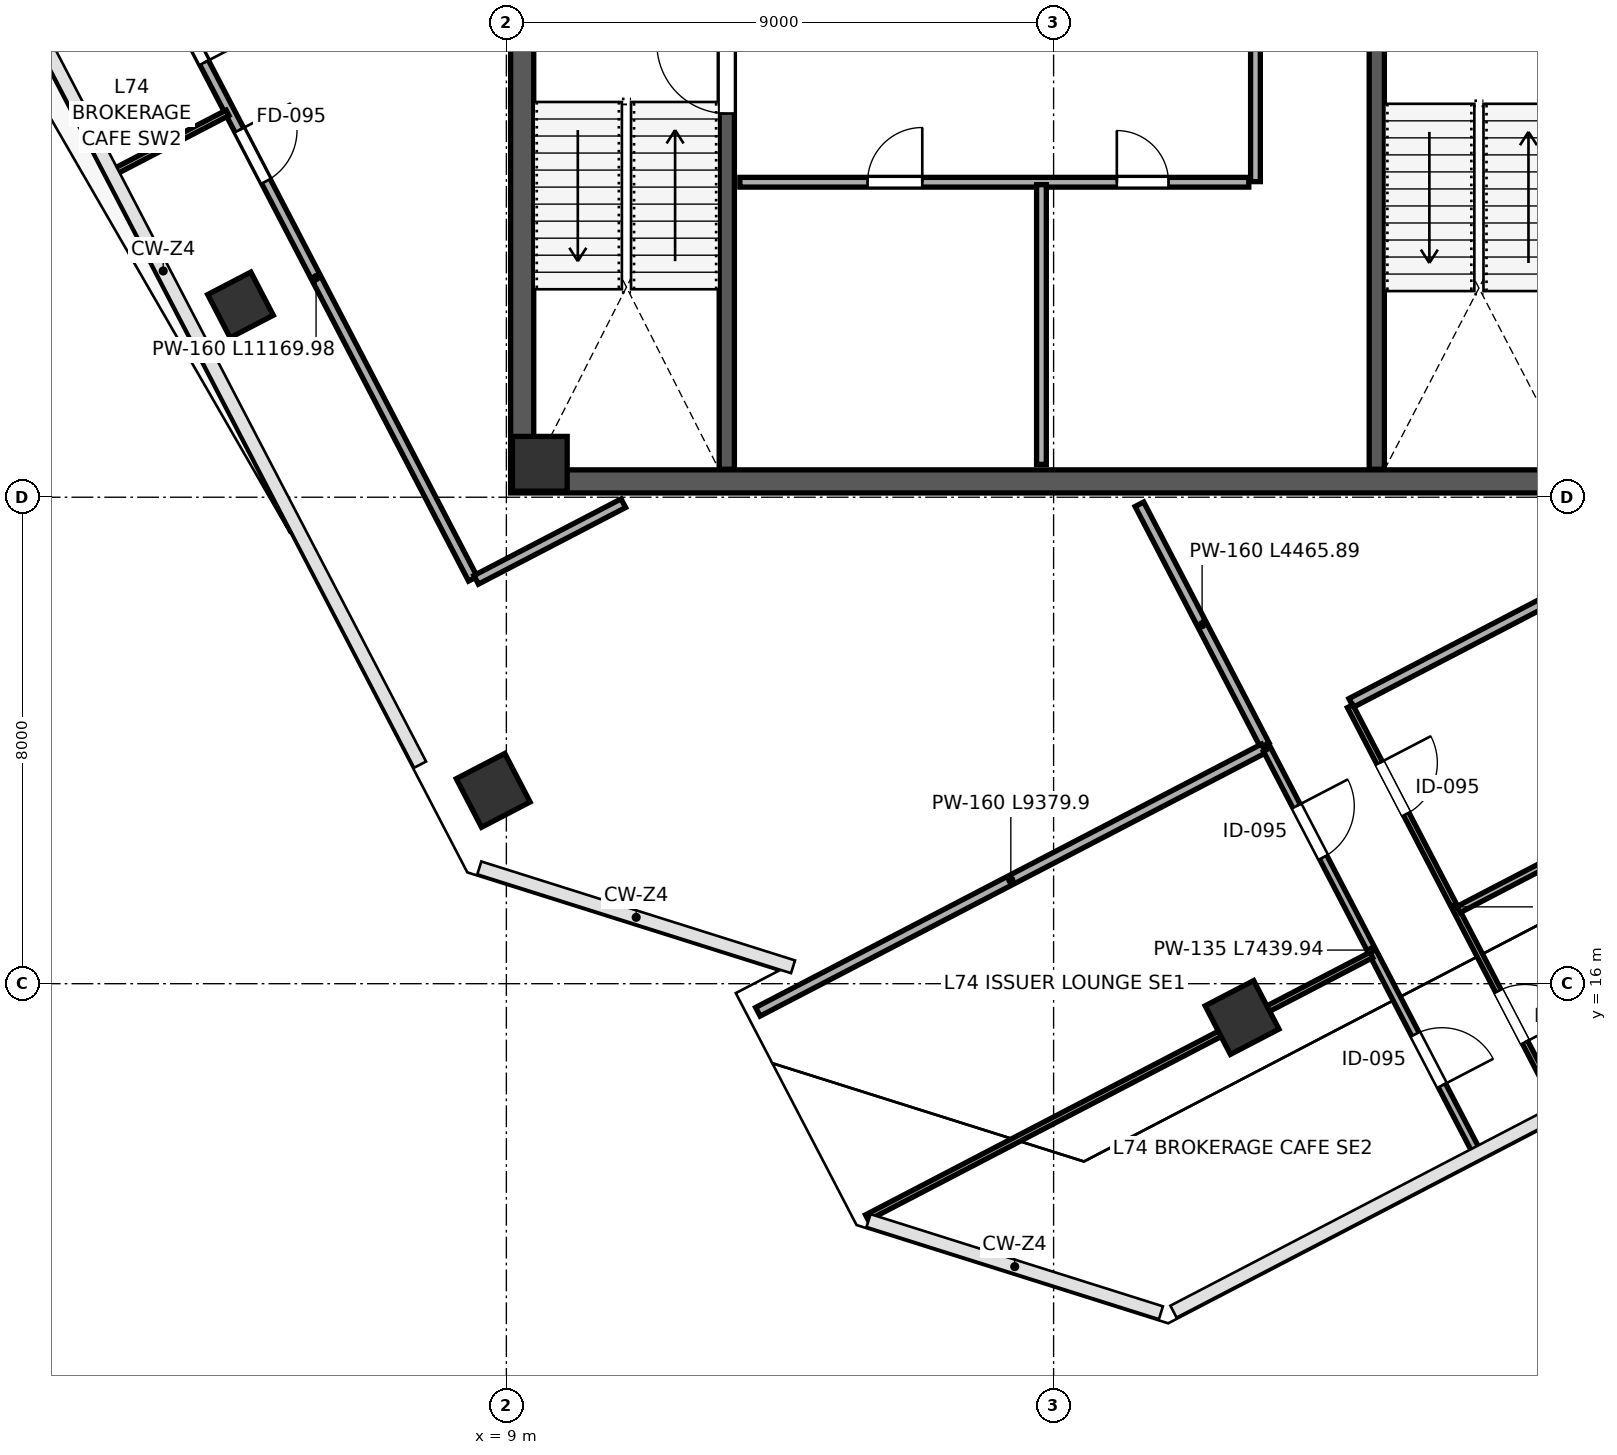
"""IFC4 building model, lengths in metres.
Left out: names, types, materials, properties, quantities, classifications, styles, units other than length and angle.
Written with IfcOpenShell. Run it as: python <this file> out.ifc"""

import sys

from ifc_helpers import new_model, si_unit, direction, frame, frame_2d, origin, origin_2d, place, context, subcontext, project, spatial, rectangle, extrude, source, transform, mapped, element, fill, save


model = new_model("IFC4")
c1 = context("Model", 3, precision=1e-05, world=origin(), true_north=direction((0.0, 1.0)))
c2 = subcontext(c1, "Body", "Model", "MODEL_VIEW")
j1 = project(units=[si_unit("LENGTHUNIT", "METRE"), si_unit("PLANEANGLEUNIT", "RADIAN")], contexts=[c1])
p1 = place(None, origin())
s1 = spatial("IfcSite", under=j1, at=p1, CompositionType="ELEMENT")
p2 = place(p1, origin())
s2 = spatial("IfcBuilding", under=s1, at=p2, CompositionType="ELEMENT")
p3 = place(p2, frame((0.0, 0.0, 328.2)))
s3 = spatial("IfcBuildingStorey", under=s2, at=p3, CompositionType="ELEMENT", Elevation=328.2)
m1 = source(origin(), c2, "Body", "SweptSolid", [
    extrude(rectangle(XDim=0.9, YDim=0.9, at=origin_2d()), origin(), (0.0, 0.0, 1.0), 4.198),
])
p4 = place(p3, frame((9.55, 24.55, 0.001), z_axis=(0.0, 0.0, 1.0), x_axis=(1.0, 0.0, 0.0)))
e1 = element("IfcColumn", 1, at=p4, inside=s3, PredefinedType="COLUMN", context=c2, shape_type="MappedRepresentation", body=[
    mapped(m1, transform((0.0, 0.0, 0.0), scale=1.0)),
])
m2 = source(origin(), c2, "Body", "SweptSolid", [
    extrude(rectangle(XDim=0.8, YDim=0.8, at=origin_2d()), origin(), (0.0, 0.0, 1.0), 4.198),
])
p5 = place(p3, frame((4.627, 27.163, 0.001), z_axis=(0.0, 0.0, 1.0), x_axis=(-0.461748613235, 0.887010833178, 0.0)))
e2 = element("IfcColumn", 2, at=p5, inside=s3, PredefinedType="COLUMN", context=c2, shape_type="MappedRepresentation", body=[
    mapped(m2, transform((0.0, 0.0, 0.0), scale=1.0)),
])
m3 = source(origin(), c2, "Body", "SweptSolid", [
    extrude(rectangle(XDim=0.9, YDim=0.9, at=origin_2d()), origin(), (0.0, 0.0, 1.0), 4.198),
])
for number, where, z_axis, x_axis in (
    (3, (8.783, 19.179, 0.001), (0.0, 0.0, 1.0), (-0.462, 0.887, 0.0)),
    (4, (21.099, 15.444, 0.001), (0.0, 0.0, 1.0), (-0.462, 0.887, 0.0)),
):
    element("IfcColumn", number, at=place(p3, frame(where, z_axis=z_axis, x_axis=x_axis)), inside=s3, PredefinedType="COLUMN", context=c2, shape_type="MappedRepresentation", body=[
        mapped(m3, transform((0.0, 0.0, 0.0), scale=1.0)),
    ])
p6 = place(p3, frame((9.26, 24.45, 0.0), z_axis=(0.0, 0.0, 1.0), x_axis=(0.0, 1.0, 0.0)))
e5 = element("IfcWall", 5, at=p6, inside=s3, PredefinedType="SHEAR", context=c2, shape_type="SweptSolid", body=[
    extrude(rectangle(XDim=15.1, YDim=0.38, at=frame_2d((7.55, 0.0))), origin(), (0.0, 0.0, 1.0), 3.96),
])
p7 = place(p6, frame((8.7, 0.0, 0.0)))
e6 = element("IfcOpeningElement", 6, at=p7, cuts=e5, PredefinedType="OPENING", context=c2, shape_type="SweptSolid", body=[
    extrude(rectangle(XDim=1.15, YDim=2.2, at=frame_2d((0.575, 1.1))), frame((0.0, 0.2, 0.0), z_axis=(0.0, -1.0, 0.0), x_axis=(1.0, 0.0, 0.0)), (0.0, 0.0, 1.0), 0.4),
])
p8 = place(p3, frame((9.07, 24.26, 0.0), z_axis=(0.0, 0.0, 1.0), x_axis=(1.0, 0.0, 0.0)))
e7 = element("IfcWall", 7, at=p8, inside=s3, PredefinedType="SHEAR", context=c2, shape_type="SweptSolid", body=[
    extrude(rectangle(XDim=17.86, YDim=0.38, at=frame_2d((8.93, 0.0))), origin(), (0.0, 0.0, 1.0), 3.96),
])
p9 = place(p3, frame((12.625, 24.46, 0.0), z_axis=(0.0, 0.0, 1.0), x_axis=(0.0, 1.0, 0.0)))
e8 = element("IfcWall", 8, at=p9, inside=s3, PredefinedType="SHEAR", context=c2, shape_type="SweptSolid", body=[
    extrude(rectangle(XDim=7.49, YDim=0.25, at=frame_2d((3.745, 0.0))), origin(), (0.0, 0.0, 1.0), 3.96),
])
p10 = place(p9, frame((5.85, 0.0, 0.0)))
e9 = element("IfcOpeningElement", 9, at=p10, cuts=e8, PredefinedType="OPENING", context=c2, shape_type="SweptSolid", body=[
    extrude(rectangle(XDim=1.15, YDim=2.2, at=frame_2d((0.575, 1.1))), frame((0.0, 0.135, 0.0), z_axis=(0.0, -1.0, 0.0), x_axis=(1.0, 0.0, 0.0)), (0.0, 0.0, 1.0), 0.27),
])
p11 = place(p3, frame((23.315, 24.46, 0.0), z_axis=(0.0, 0.0, 1.0), x_axis=(0.0, 1.0, 0.0)))
e10 = element("IfcWall", 10, at=p11, inside=s3, PredefinedType="SHEAR", context=c2, shape_type="SweptSolid", body=[
    extrude(rectangle(XDim=7.49, YDim=0.25, at=frame_2d((3.745, 0.0))), origin(), (0.0, 0.0, 1.0), 3.96),
])
p12 = place(p3, frame((12.84, 29.18, 0.0), z_axis=(0.0, 0.0, 1.0), x_axis=(1.0, 0.0, 0.0)))
e11 = element("IfcWall", 11, at=p12, inside=s3, PredefinedType="PARTITIONING", context=c2, shape_type="SweptSolid", body=[
    extrude(rectangle(XDim=8.37, YDim=0.16, at=frame_2d((4.185, 0.0))), origin(), (0.0, 0.0, 1.0), 3.96),
])
p13 = place(p12, frame((2.1, 0.0, 0.0)))
e12 = element("IfcOpeningElement", 12, at=p13, cuts=e11, PredefinedType="OPENING", context=c2, shape_type="SweptSolid", body=[
    extrude(rectangle(XDim=0.9, YDim=2.15, at=frame_2d((0.45, 1.075))), frame((0.0, 0.09, 0.0), z_axis=(0.0, -1.0, 0.0), x_axis=(1.0, 0.0, 0.0)), (0.0, 0.0, 1.0), 0.18),
])
p14 = place(p12, frame((6.2, 0.0, 0.0)))
e13 = element("IfcOpeningElement", 13, at=p14, cuts=e11, PredefinedType="OPENING", context=c2, shape_type="SweptSolid", body=[
    extrude(rectangle(XDim=0.85, YDim=2.1, at=frame_2d((0.425, 1.05))), frame((0.0, 0.09, 0.0), z_axis=(0.0, -1.0, 0.0), x_axis=(1.0, 0.0, 0.0)), (0.0, 0.0, 1.0), 0.18),
])
p15 = place(p3, frame((17.8, 24.54, 0.0), z_axis=(0.0, 0.0, 1.0), x_axis=(0.0, 1.0, 0.0)))
e14 = element("IfcWall", 14, at=p15, inside=s3, PredefinedType="PARTITIONING", context=c2, shape_type="SweptSolid", body=[
    extrude(rectangle(XDim=4.6, YDim=0.16, at=frame_2d((2.3, 0.0))), origin(), (0.0, 0.0, 1.0), 3.96),
])
p16 = place(p3, frame((21.32, 29.19, 0.0), z_axis=(0.0, 0.0, 1.0), x_axis=(0.0, 1.0, 0.0)))
e15 = element("IfcWall", 15, at=p16, inside=s3, PredefinedType="PARTITIONING", context=c2, shape_type="SweptSolid", body=[
    extrude(rectangle(XDim=2.92, YDim=0.16, at=frame_2d((1.46, 0.0))), origin(), (0.0, 0.0, 1.0), 3.96),
])
p17 = place(p3, frame((3.291, 32.566, 0.0), z_axis=(0.0, 0.0, 1.0), x_axis=(0.461745644878, -0.887012378401, 0.0)))
e16 = element("IfcWall", 16, at=p17, inside=s3, PredefinedType="PARTITIONING", context=c2, shape_type="SweptSolid", body=[
    extrude(rectangle(XDim=11.17, YDim=0.16, at=frame_2d((5.585, 0.0))), origin(), (0.0, 0.0, 1.0), 3.96),
])
p18 = place(p17, frame((0.65, 0.0, 0.0)))
e17 = element("IfcOpeningElement", 17, at=p18, cuts=e16, PredefinedType="OPENING", context=c2, shape_type="SweptSolid", body=[
    extrude(rectangle(XDim=0.95, YDim=2.15, at=frame_2d((0.475, 1.075))), frame((0.0, 0.09, 0.0), z_axis=(0.0, -1.0, 0.0), x_axis=(1.0, 0.0, 0.0)), (0.0, 0.0, 1.0), 0.18),
])
p19 = place(p17, frame((2.85, 0.0, 0.0)))
e18 = element("IfcOpeningElement", 18, at=p19, cuts=e16, PredefinedType="OPENING", context=c2, shape_type="SweptSolid", body=[
    extrude(rectangle(XDim=0.95, YDim=2.15, at=frame_2d((0.475, 1.075))), frame((0.0, 0.09, 0.0), z_axis=(0.0, -1.0, 0.0), x_axis=(1.0, 0.0, 0.0)), (0.0, 0.0, 1.0), 0.18),
])
p20 = place(p3, frame((8.503, 22.641, 0.0), z_axis=(0.0, 0.0, 1.0), x_axis=(0.886991176538, 0.461786371328, 0.0)))
e19 = element("IfcWall", 19, at=p20, inside=s3, PredefinedType="PARTITIONING", context=c2, shape_type="SweptSolid", body=[
    extrude(rectangle(XDim=2.729, YDim=0.16, at=frame_2d((1.365, 0.0))), origin(), (0.0, 0.0, 1.0), 3.96),
])
p21 = place(p3, frame((19.411, 23.885, 0.0), z_axis=(0.0, 0.0, 1.0), x_axis=(0.461717603384, -0.887026975196, 0.0)))
e20 = element("IfcWall", 20, at=p21, inside=s3, PredefinedType="PARTITIONING", context=c2, shape_type="SweptSolid", body=[
    extrude(rectangle(XDim=4.466, YDim=0.16, at=frame_2d((2.233, 0.0))), origin(), (0.0, 0.0, 1.0), 3.96),
])
p22 = place(p3, frame((2.561, 29.356, 0.0), z_axis=(0.0, 0.0, 1.0), x_axis=(0.887019740079, 0.461731502835, 0.0)))
e21 = element("IfcWall", 21, at=p22, inside=s3, PredefinedType="PARTITIONING", context=c2, shape_type="SweptSolid", body=[
    extrude(rectangle(XDim=2.09, YDim=0.1, at=frame_2d((1.045, 0.0))), origin(), (0.0, 0.0, 1.0), 3.295),
])
p23 = place(p3, frame((24.007, 49.664, 0.0), z_axis=(0.0, 0.0, 1.0), x_axis=(0.461753963132, -0.887008048178, 0.0)))
e22 = element("IfcWall", 22, at=p23, inside=s3, PredefinedType="PARTITIONING", context=c2, shape_type="SweptSolid", body=[
    extrude(rectangle(XDim=25.21, YDim=0.135, at=frame_2d((12.605, 0.0))), origin(), (0.0, 0.0, 1.0), 3.96),
])
p24 = place(p23, frame((4.3, 0.0, 0.0)))
e23 = element("IfcOpeningElement", 23, at=p24, cuts=e22, PredefinedType="OPENING", context=c2, shape_type="SweptSolid", body=[
    extrude(rectangle(XDim=0.95, YDim=2.15, at=frame_2d((0.475, 1.075))), frame((0.0, 0.078, 0.0), z_axis=(0.0, -1.0, 0.0), x_axis=(1.0, 0.0, 0.0)), (0.0, 0.0, 1.0), 0.155),
])
p25 = place(p23, frame((8.3, 0.0, 0.0)))
e24 = element("IfcOpeningElement", 24, at=p25, cuts=e22, PredefinedType="OPENING", context=c2, shape_type="SweptSolid", body=[
    extrude(rectangle(XDim=0.95, YDim=2.15, at=frame_2d((0.475, 1.075))), frame((0.0, 0.078, 0.0), z_axis=(0.0, -1.0, 0.0), x_axis=(1.0, 0.0, 0.0)), (0.0, 0.0, 1.0), 0.155),
])
p26 = place(p3, frame((22.893, 20.617, 0.0), z_axis=(0.0, 0.0, 1.0), x_axis=(0.887013262899, 0.461743945755, 0.0)))
e25 = element("IfcWall", 25, at=p26, inside=s3, PredefinedType="PARTITIONING", context=c2, shape_type="SweptSolid", body=[
    extrude(rectangle(XDim=20.04, YDim=0.16, at=frame_2d((10.02, 0.0))), origin(), (0.0, 0.0, 1.0), 3.96),
])
p27 = place(p3, frame((13.136, 15.538, 0.0), z_axis=(0.0, 0.0, 1.0), x_axis=(0.887015145491, 0.461740329265, 0.0)))
e26 = element("IfcWall", 26, at=p27, inside=s3, PredefinedType="PARTITIONING", context=c2, shape_type="SweptSolid", body=[
    extrude(rectangle(XDim=9.38, YDim=0.16, at=frame_2d((4.69, 0.0))), origin(), (0.0, 0.0, 1.0), 3.96),
])
p28 = place(p3, frame((22.876, 20.563, 0.0), z_axis=(0.0, 0.0, 1.0), x_axis=(0.461750488306, -0.887009857076, 0.0)))
e27 = element("IfcWall", 27, at=p28, inside=s3, PredefinedType="PARTITIONING", context=c2, shape_type="SweptSolid", body=[
    extrude(rectangle(XDim=7.44, YDim=0.1, at=frame_2d((3.72, 0.0))), origin(), (0.0, 0.0, 1.0), 3.252),
])
p29 = place(p28, frame((1.05, 0.0, 0.0)))
e28 = element("IfcOpeningElement", 28, at=p29, cuts=e27, PredefinedType="OPENING", context=c2, shape_type="SweptSolid", body=[
    extrude(rectangle(XDim=0.95, YDim=2.15, at=frame_2d((0.475, 1.075))), frame((0.0, 0.06, 0.0), z_axis=(0.0, -1.0, 0.0), x_axis=(1.0, 0.0, 0.0)), (0.0, 0.0, 1.0), 0.12),
])
p30 = place(p28, frame((5.28, 0.0, 0.0)))
e29 = element("IfcOpeningElement", 29, at=p30, cuts=e27, PredefinedType="OPENING", context=c2, shape_type="SweptSolid", body=[
    extrude(rectangle(XDim=0.95, YDim=2.15, at=frame_2d((0.475, 1.075))), frame((0.0, 0.06, 0.0), z_axis=(0.0, -1.0, 0.0), x_axis=(1.0, 0.0, 0.0)), (0.0, 0.0, 1.0), 0.12),
])
p31 = place(p3, frame((21.51, 19.852, 0.0), z_axis=(0.0, 0.0, 1.0), x_axis=(0.461737048058, -0.887016853532, 0.0)))
e30 = element("IfcWall", 30, at=p31, inside=s3, PredefinedType="PARTITIONING", context=c2, shape_type="SweptSolid", body=[
    extrude(rectangle(XDim=7.44, YDim=0.135, at=frame_2d((3.72, 0.0))), origin(), (0.0, 0.0, 1.0), 3.252),
])
p32 = place(p31, frame((1.05, 0.0, 0.0)))
e31 = element("IfcOpeningElement", 31, at=p32, cuts=e30, PredefinedType="OPENING", context=c2, shape_type="SweptSolid", body=[
    extrude(rectangle(XDim=0.95, YDim=2.15, at=frame_2d((0.475, 1.075))), frame((0.0, 0.078, 0.0), z_axis=(0.0, -1.0, 0.0), x_axis=(1.0, 0.0, 0.0)), (0.0, 0.0, 1.0), 0.155),
])
p33 = place(p31, frame((5.28, 0.0, 0.0)))
e32 = element("IfcOpeningElement", 32, at=p33, cuts=e30, PredefinedType="OPENING", context=c2, shape_type="SweptSolid", body=[
    extrude(rectangle(XDim=0.95, YDim=2.15, at=frame_2d((0.475, 1.075))), frame((0.0, 0.078, 0.0), z_axis=(0.0, -1.0, 0.0), x_axis=(1.0, 0.0, 0.0)), (0.0, 0.0, 1.0), 0.155),
])
p34 = place(p3, frame((24.662, 17.22, 0.0), z_axis=(0.0, 0.0, 1.0), x_axis=(0.887015173056, 0.461740276312, 0.0)))
e33 = element("IfcWall", 33, at=p34, inside=s3, PredefinedType="PARTITIONING", context=c2, shape_type="SweptSolid", body=[
    extrude(rectangle(XDim=20.012, YDim=0.115, at=frame_2d((10.006, 0.0))), origin(), (0.0, 0.0, 1.0), 2.795),
])
p35 = place(p3, frame((14.93, 12.154, 0.0), z_axis=(0.0, 0.0, 1.0), x_axis=(0.887014112301, 0.461742314044, 0.0)))
e34 = element("IfcWall", 34, at=p35, inside=s3, PredefinedType="PARTITIONING", context=c2, shape_type="SweptSolid", body=[
    extrude(rectangle(XDim=9.352, YDim=0.1, at=frame_2d((4.676, 0.0))), origin(), (0.0, 0.0, 1.0), 2.795),
])
m4 = source(origin(), c2, "Body", "SweptSolid", [
    extrude(rectangle(XDim=1.15, YDim=2.2, at=frame_2d((0.575, 1.1))), frame((0.0, 0.025, 0.0), z_axis=(0.0, -1.0, 0.0), x_axis=(1.0, 0.0, 0.0)), (0.0, 0.0, 1.0), 0.05),
])
p36 = place(p10, origin())
e35 = element("IfcDoor", 35, at=p36, inside=s3, OperationType="SINGLE_SWING_RIGHT", PredefinedType="DOOR", context=c2, shape_type="MappedRepresentation", body=[
    mapped(m4, transform((0.0, 0.0, 0.0), scale=1.0)),
])
fill(e9, e35)
m5 = source(origin(), c2, "Body", "SweptSolid", [
    extrude(rectangle(XDim=0.9, YDim=2.15, at=frame_2d((0.45, 1.075))), frame((0.0, 0.025, 0.0), z_axis=(0.0, -1.0, 0.0), x_axis=(1.0, 0.0, 0.0)), (0.0, 0.0, 1.0), 0.05),
])
p37 = place(p13, origin())
e36 = element("IfcDoor", 36, at=p37, inside=s3, OperationType="SINGLE_SWING_RIGHT", PredefinedType="DOOR", context=c2, shape_type="MappedRepresentation", body=[
    mapped(m5, transform((0.0, 0.0, 0.0), scale=1.0)),
])
fill(e12, e36)
m6 = source(origin(), c2, "Body", "SweptSolid", [
    extrude(rectangle(XDim=0.85, YDim=2.1, at=frame_2d((0.425, 1.05))), frame((0.0, 0.025, 0.0), z_axis=(0.0, -1.0, 0.0), x_axis=(1.0, 0.0, 0.0)), (0.0, 0.0, 1.0), 0.05),
])
p38 = place(p14, origin())
e37 = element("IfcDoor", 37, at=p38, inside=s3, OperationType="SINGLE_SWING_LEFT", PredefinedType="DOOR", context=c2, shape_type="MappedRepresentation", body=[
    mapped(m6, transform((0.0, 0.0, 0.0), scale=1.0)),
])
fill(e13, e37)
m7 = source(origin(), c2, "Body", "SweptSolid", [
    extrude(rectangle(XDim=0.95, YDim=2.15, at=frame_2d((0.475, 1.075))), frame((0.0, 0.025, 0.0), z_axis=(0.0, -1.0, 0.0), x_axis=(1.0, 0.0, 0.0)), (0.0, 0.0, 1.0), 0.05),
])
p39 = place(p18, origin())
e38 = element("IfcDoor", 38, at=p39, inside=s3, OperationType="SINGLE_SWING_RIGHT", PredefinedType="DOOR", context=c2, shape_type="MappedRepresentation", body=[
    mapped(m7, transform((0.0, 0.0, 0.0), scale=1.0)),
])
fill(e17, e38)
p40 = place(p19, origin())
e39 = element("IfcDoor", 39, at=p40, inside=s3, OperationType="SINGLE_SWING_LEFT", PredefinedType="DOOR", context=c2, shape_type="MappedRepresentation", body=[
    mapped(m7, transform((0.0, 0.0, 0.0), scale=1.0)),
])
fill(e18, e39)
m8 = source(origin(), c2, "Body", "SweptSolid", [
    extrude(rectangle(XDim=0.95, YDim=2.15, at=frame_2d((0.475, 1.075))), frame((0.0, 0.025, 0.0), z_axis=(0.0, -1.0, 0.0), x_axis=(1.0, 0.0, 0.0)), (0.0, 0.0, 1.0), 0.05),
])
p41 = place(p29, origin())
e40 = element("IfcDoor", 40, at=p41, inside=s3, OperationType="SINGLE_SWING_LEFT", PredefinedType="DOOR", context=c2, shape_type="MappedRepresentation", body=[
    mapped(m8, transform((0.0, 0.0, 0.0), scale=1.0)),
])
fill(e28, e40)
p42 = place(p30, origin())
e41 = element("IfcDoor", 41, at=p42, inside=s3, OperationType="SINGLE_SWING_RIGHT", PredefinedType="DOOR", context=c2, shape_type="MappedRepresentation", body=[
    mapped(m8, transform((0.0, 0.0, 0.0), scale=1.0)),
])
fill(e29, e41)
p43 = place(p32, origin())
e42 = element("IfcDoor", 42, at=p43, inside=s3, OperationType="SINGLE_SWING_LEFT", PredefinedType="DOOR", context=c2, shape_type="MappedRepresentation", body=[
    mapped(m8, transform((0.0, 0.0, 0.0), scale=1.0)),
])
fill(e31, e42)
p44 = place(p33, origin())
e43 = element("IfcDoor", 43, at=p44, inside=s3, OperationType="SINGLE_SWING_RIGHT", PredefinedType="DOOR", context=c2, shape_type="MappedRepresentation", body=[
    mapped(m8, transform((0.0, 0.0, 0.0), scale=1.0)),
])
fill(e32, e43)
save(model, sys.argv[1])
